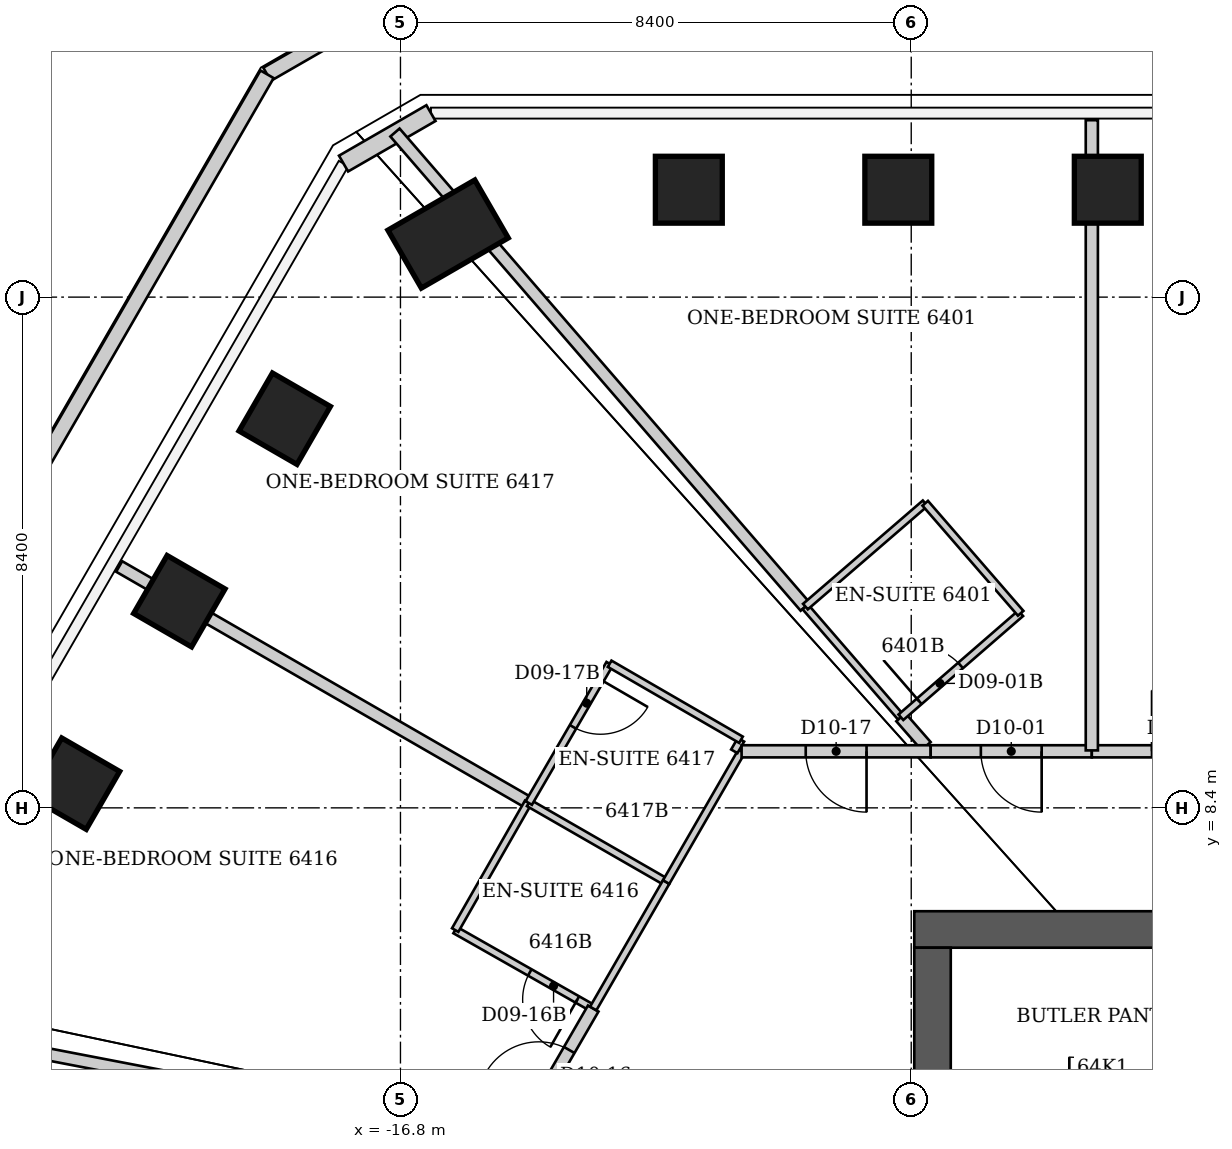
"""IFC4 building model, lengths in metres.
Left out: names, types, materials, properties, quantities, classifications, styles, units other than length and angle.
Written with IfcOpenShell. Run it as: python <this file> out.ifc"""

import sys

from ifc_helpers import new_model, si_unit, direction, frame, frame_2d, origin, origin_2d, place, context, subcontext, project, spatial, rectangle, extrude, clip, halfspace, element, fill, save


model = new_model("IFC4")
c1 = context("Model", 3, precision=1e-05, world=origin(), true_north=direction((0.0, 1.0)))
c2 = subcontext(c1, "Body", "Model", "MODEL_VIEW")
j1 = project(units=[si_unit("LENGTHUNIT", "METRE"), si_unit("PLANEANGLEUNIT", "RADIAN")], contexts=[c1])
p1 = place(None, origin())
s1 = spatial("IfcSite", under=j1, at=p1, CompositionType="ELEMENT")
p2 = place(p1, origin())
s2 = spatial("IfcBuilding", under=s1, at=p2, CompositionType="ELEMENT")
p3 = place(p2, frame((0.0, 0.0, 257.0)))
s3 = spatial("IfcBuildingStorey", under=s2, at=p3, CompositionType="ELEMENT", Elevation=257.0)
p4 = place(p3, frame((-12.058, 18.566, -0.067), z_axis=(0.0, 0.0, 1.0), x_axis=(0.0, 1.0, 0.0)))
e1 = element("IfcColumn", 1, at=p4, inside=s3, PredefinedType="COLUMN", context=c2, shape_type="SweptSolid", body=[
    clip(extrude(rectangle(XDim=1.1, YDim=1.1, at=origin_2d()), origin(), (0.0, 0.0, 1.0), 3.867), halfspace(frame((0.0, 0.0, 0.067)), True)),
])
p5 = place(p3, frame((-8.613, 18.566, -0.06), z_axis=(0.0, 0.0, 1.0), x_axis=(0.0, 1.0, 0.0)))
e2 = element("IfcColumn", 2, at=p5, inside=s3, PredefinedType="COLUMN", context=c2, shape_type="SweptSolid", body=[
    clip(extrude(rectangle(XDim=1.1, YDim=1.1, at=origin_2d()), origin(), (0.0, 0.0, 1.0), 3.86), halfspace(frame((0.0, 0.0, 0.06)), True)),
])
p6 = place(p3, frame((-5.167, 18.566, -0.052), z_axis=(0.0, 0.0, 1.0), x_axis=(0.0, 1.0, 0.0)))
e3 = element("IfcColumn", 3, at=p6, inside=s3, PredefinedType="COLUMN", context=c2, shape_type="SweptSolid", body=[
    clip(extrude(rectangle(XDim=1.1, YDim=1.1, at=origin_2d()), origin(), (0.0, 0.0, 1.0), 3.852), halfspace(frame((0.0, 0.0, 0.052)), True)),
])
p7 = place(p3, frame((-22.169, 8.798, -0.059), z_axis=(0.0, 0.0, 1.0), x_axis=(-0.866025403784, 0.5, 0.0)))
e4 = element("IfcColumn", 4, at=p7, inside=s3, PredefinedType="COLUMN", context=c2, shape_type="SweptSolid", body=[
    clip(extrude(rectangle(XDim=1.1, YDim=1.1, at=origin_2d()), origin(), (0.0, 0.0, 1.0), 3.859), halfspace(frame((0.0, 0.0, 0.059)), True)),
])
p8 = place(p3, frame((-20.437, 11.799, -0.051), z_axis=(0.0, 0.0, 1.0), x_axis=(-0.866025403784, 0.5, 0.0)))
e5 = element("IfcColumn", 5, at=p8, inside=s3, PredefinedType="COLUMN", context=c2, shape_type="SweptSolid", body=[
    clip(extrude(rectangle(XDim=1.1, YDim=1.1, at=origin_2d()), origin(), (0.0, 0.0, 1.0), 3.851), halfspace(frame((0.0, 0.0, 0.051)), True)),
])
p9 = place(p3, frame((-18.704, 14.8, -0.059), z_axis=(0.0, 0.0, 1.0), x_axis=(-0.866025403784, 0.5, 0.0)))
e6 = element("IfcColumn", 6, at=p9, inside=s3, PredefinedType="COLUMN", context=c2, shape_type="SweptSolid", body=[
    clip(extrude(rectangle(XDim=1.1, YDim=1.1, at=origin_2d()), origin(), (0.0, 0.0, 1.0), 3.859), halfspace(frame((0.0, 0.0, 0.059)), True)),
])
p10 = place(p3, frame((-16.017, 17.837, -0.069), z_axis=(0.0, 0.0, 1.0), x_axis=(-0.5, 0.866025403784, 0.0)))
e7 = element("IfcColumn", 7, at=p10, inside=s3, PredefinedType="COLUMN", context=c2, shape_type="SweptSolid", body=[
    clip(extrude(rectangle(XDim=1.1, YDim=1.65, at=origin_2d()), origin(), (0.0, 0.0, 1.0), 3.869), halfspace(frame((0.0, 0.0, 0.069)), True)),
])
p11 = place(p3, frame((-8.35, 6.4, 0.0), z_axis=(0.0, 0.0, 1.0), x_axis=(1.0, 0.0, 0.0)))
e8 = element("IfcWall", 8, at=p11, inside=s3, PredefinedType="SHEAR", context=c2, shape_type="SweptSolid", body=[
    extrude(rectangle(XDim=16.7, YDim=0.6, at=frame_2d((8.35, 0.0))), origin(), (0.0, 0.0, 1.0), 3.8),
])
p12 = place(p11, frame((6.488, 0.0, 0.0)))
e9 = element("IfcOpeningElement", 9, at=p12, cuts=e8, PredefinedType="OPENING", context=c2, shape_type="SweptSolid", body=[
    extrude(rectangle(XDim=1.1, YDim=2.1, at=frame_2d((0.55, 1.05))), frame((0.0, 0.3, 0.0), z_axis=(0.0, -1.0, 0.0), x_axis=(1.0, 0.0, 0.0)), (0.0, 0.0, 1.0), 0.6),
])
p13 = place(p11, frame((9.113, 0.0, 0.0)))
e10 = element("IfcOpeningElement", 10, at=p13, cuts=e8, PredefinedType="OPENING", context=c2, shape_type="SweptSolid", body=[
    extrude(rectangle(XDim=1.1, YDim=2.1, at=frame_2d((0.55, 1.05))), frame((0.0, 0.3, 0.0), z_axis=(0.0, -1.0, 0.0), x_axis=(1.0, 0.0, 0.0)), (0.0, 0.0, 1.0), 0.6),
])
p14 = place(p11, frame((11.738, 0.0, 0.0)))
e11 = element("IfcOpeningElement", 11, at=p14, cuts=e8, PredefinedType="OPENING", context=c2, shape_type="SweptSolid", body=[
    extrude(rectangle(XDim=1.1, YDim=2.1, at=frame_2d((0.55, 1.05))), frame((0.0, 0.3, 0.0), z_axis=(0.0, -1.0, 0.0), x_axis=(1.0, 0.0, 0.0)), (0.0, 0.0, 1.0), 0.6),
])
p15 = place(p11, frame((14.363, 0.0, 0.0)))
e12 = element("IfcOpeningElement", 12, at=p15, cuts=e8, PredefinedType="OPENING", context=c2, shape_type="SweptSolid", body=[
    extrude(rectangle(XDim=1.1, YDim=2.1, at=frame_2d((0.55, 1.05))), frame((0.0, 0.3, 0.0), z_axis=(0.0, -1.0, 0.0), x_axis=(1.0, 0.0, 0.0)), (0.0, 0.0, 1.0), 0.6),
])
p16 = place(p3, frame((-8.05, -6.1, 0.0), z_axis=(0.0, 0.0, 1.0), x_axis=(0.0, 1.0, 0.0)))
e13 = element("IfcWall", 13, at=p16, inside=s3, PredefinedType="SHEAR", context=c2, shape_type="SweptSolid", body=[
    extrude(rectangle(XDim=12.2, YDim=0.6, at=frame_2d((6.1, 0.0))), origin(), (0.0, 0.0, 1.0), 3.8),
])
p17 = place(p16, frame((7.6, 0.0, 0.0)))
e14 = element("IfcOpeningElement", 14, at=p17, cuts=e13, PredefinedType="OPENING", context=c2, shape_type="SweptSolid", body=[
    extrude(rectangle(XDim=1.2, YDim=2.2, at=frame_2d((0.6, 1.1))), frame((0.0, 0.3, 0.0), z_axis=(0.0, -1.0, 0.0), x_axis=(1.0, 0.0, 0.0)), (0.0, 0.0, 1.0), 0.6),
])
p18 = place(p3, frame((-17.736, 18.996, 0.0), z_axis=(0.0, 0.0, 1.0), x_axis=(0.866026405774, 0.499998264499, 0.0)))
e15 = element("IfcWall", 15, at=p18, inside=s3, PredefinedType="SOLIDWALL", context=c2, shape_type="SweptSolid", body=[
    extrude(rectangle(XDim=1.66, YDim=0.3, at=frame_2d((0.83, 0.0))), origin(), (0.0, 0.0, 1.0), 3.64),
])
p19 = place(p3, frame((-17.468, 21.344, 0.0), z_axis=(0.0, 0.0, 1.0), x_axis=(-0.866531606097, -0.499122205112, 0.0)))
e16 = element("IfcWall", 16, at=p19, inside=s3, PredefinedType="PARAPET", context=c2, shape_type="SweptSolid", body=[
    extrude(rectangle(XDim=1.761, YDim=0.25, at=frame_2d((0.88, 0.0))), origin(), (0.0, 0.0, 1.0), 1.1),
])
p20 = place(p3, frame((-18.994, 20.465, 0.0), z_axis=(0.0, 0.0, 1.0), x_axis=(-0.49999647861, -0.86602743685, 0.0)))
e17 = element("IfcWall", 17, at=p20, inside=s3, PredefinedType="PARAPET", context=c2, shape_type="SweptSolid", body=[
    extrude(rectangle(XDim=16.453, YDim=0.25, at=frame_2d((8.226, 0.0))), origin(), (0.0, 0.0, 1.0), 1.1),
])
p21 = place(p3, frame((-27.219, 4.456, 0.0), z_axis=(0.0, 0.0, 1.0), x_axis=(0.499998496786, -0.866026271663, 0.0)))
e18 = element("IfcWall", 18, at=p21, inside=s3, PredefinedType="PARAPET", context=c2, shape_type="SweptSolid", body=[
    extrude(rectangle(XDim=34.936, YDim=0.25, at=frame_2d((17.468, 0.0))), origin(), (0.0, 0.0, 1.0), 1.1),
])
p22 = place(p3, frame((-25.341, 4.874, 0.0), z_axis=(0.0, 0.0, 1.0), x_axis=(0.982001168061, -0.188874841966, 0.0)))
e19 = element("IfcWall", 19, at=p22, inside=s3, PredefinedType="PARTITIONING", context=c2, shape_type="SweptSolid", body=[
    extrude(rectangle(XDim=10.557, YDim=0.2, at=frame_2d((5.278, 0.0))), origin(), (0.0, 0.0, 1.0), 3.64),
])
p23 = place(p3, frame((-21.426, 12.37, 0.0), z_axis=(0.0, 0.0, 1.0), x_axis=(0.866202335538, -0.499693419917, 0.0)))
e20 = element("IfcWall", 20, at=p23, inside=s3, PredefinedType="PARTITIONING", context=c2, shape_type="SweptSolid", body=[
    extrude(rectangle(XDim=7.765, YDim=0.2, at=frame_2d((3.883, 0.0))), origin(), (0.0, 0.0, 1.0), 2.878),
])
p24 = place(p3, frame((-16.89, 19.507, 0.0), z_axis=(0.0, 0.0, 1.0), x_axis=(0.654250750888, -0.756277696989, 0.0)))
e21 = element("IfcWall", 21, at=p24, inside=s3, PredefinedType="PARTITIONING", context=c2, shape_type="SweptSolid", body=[
    extrude(rectangle(XDim=10.313, YDim=0.2, at=frame_2d((5.157, 0.0))), origin(), (0.0, 0.0, 1.0), 3.64),
])
p25 = place(p3, frame((-15.9, 6.39, 0.0), z_axis=(0.0, 0.0, 1.0), x_axis=(0.869431908012, -0.494052787999, 0.0)))
e22 = element("IfcWall", 22, at=p25, inside=s3, PredefinedType="PARTITIONING", context=c2, shape_type="SweptSolid", body=[
    extrude(rectangle(XDim=2.611, YDim=0.12, at=frame_2d((1.305, 0.0))), origin(), (0.0, 0.0, 1.0), 3.64),
])
p26 = place(p25, frame((1.411, 0.0, 0.0)))
e23 = element("IfcOpeningElement", 23, at=p26, cuts=e22, PredefinedType="OPENING", context=c2, shape_type="SweptSolid", body=[
    extrude(rectangle(XDim=0.9, YDim=2.03, at=frame_2d((0.45, 1.015))), frame((0.0, 0.06, 0.0), z_axis=(0.0, -1.0, 0.0), x_axis=(1.0, 0.0, 0.0)), (0.0, 0.0, 1.0), 0.12),
])
p27 = place(p3, frame((-14.92, 2.87, 0.0), z_axis=(0.0, 0.0, 1.0), x_axis=(0.500714932888, 0.865612243434, 0.0)))
e24 = element("IfcWall", 24, at=p27, inside=s3, PredefinedType="PARTITIONING", context=c2, shape_type="SweptSolid", body=[
    extrude(rectangle(XDim=2.576, YDim=0.2, at=frame_2d((1.288, 0.0))), origin(), (0.0, 0.0, 1.0), 3.64),
])
p28 = place(p27, frame((0.788, 0.0, 0.0)))
e25 = element("IfcOpeningElement", 25, at=p28, cuts=e24, PredefinedType="OPENING", context=c2, shape_type="SweptSolid", body=[
    extrude(rectangle(XDim=1.0, YDim=2.13, at=frame_2d((0.5, 1.065))), frame((0.0, 0.1, 0.0), z_axis=(0.0, -1.0, 0.0), x_axis=(1.0, 0.0, 0.0)), (0.0, 0.0, 1.0), 0.2),
])
p29 = place(p3, frame((-14.7, 8.49, 0.0), z_axis=(0.0, 0.0, 1.0), x_axis=(-0.496106327528, -0.868261776072, 0.0)))
e26 = element("IfcWall", 26, at=p29, inside=s3, PredefinedType="PARTITIONING", context=c2, shape_type="SweptSolid", body=[
    extrude(rectangle(XDim=2.419, YDim=0.12, at=frame_2d((1.209, 0.0))), origin(), (0.0, 0.0, 1.0), 3.64),
])
p30 = place(p3, frame((-14.69, 8.48, 0.0), z_axis=(0.0, 0.0, 1.0), x_axis=(0.866816256489, -0.498627694264, 0.0)))
e27 = element("IfcWall", 27, at=p30, inside=s3, PredefinedType="PARTITIONING", context=c2, shape_type="SweptSolid", body=[
    extrude(rectangle(XDim=2.607, YDim=0.12, at=frame_2d((1.304, 0.0))), origin(), (0.0, 0.0, 1.0), 2.878),
])
p31 = place(p3, frame((-13.63, 5.1, 0.0), z_axis=(0.0, 0.0, 1.0), x_axis=(0.499737123639, 0.866177122335, 0.0)))
e28 = element("IfcWall", 28, at=p31, inside=s3, PredefinedType="PARTITIONING", context=c2, shape_type="SweptSolid", body=[
    extrude(rectangle(XDim=2.401, YDim=0.12, at=frame_2d((1.201, 0.0))), origin(), (0.0, 0.0, 1.0), 3.64),
])
p32 = place(p3, frame((-13.36, 10.77, 0.0), z_axis=(0.0, 0.0, 1.0), x_axis=(-0.502173326652, -0.864766991738, 0.0)))
e29 = element("IfcWall", 29, at=p32, inside=s3, PredefinedType="PARTITIONING", context=c2, shape_type="SweptSolid", body=[
    extrude(rectangle(XDim=2.648, YDim=0.12, at=frame_2d((1.324, 0.0))), origin(), (0.0, 0.0, 1.0), 3.64),
])
p33 = place(p32, frame((0.3, 0.0, 0.0)))
e30 = element("IfcOpeningElement", 30, at=p33, cuts=e29, PredefinedType="OPENING", context=c2, shape_type="SweptSolid", body=[
    extrude(rectangle(XDim=0.9, YDim=2.03, at=frame_2d((0.45, 1.015))), frame((0.0, 0.06, 0.0), z_axis=(0.0, -1.0, 0.0), x_axis=(1.0, 0.0, 0.0)), (0.0, 0.0, 1.0), 0.12),
])
p34 = place(p3, frame((-12.43, 7.18, 0.0), z_axis=(0.0, 0.0, 1.0), x_axis=(0.499577688184, 0.866269088372, 0.0)))
e31 = element("IfcWall", 31, at=p34, inside=s3, PredefinedType="PARTITIONING", context=c2, shape_type="SweptSolid", body=[
    extrude(rectangle(XDim=2.482, YDim=0.12, at=frame_2d((1.241, 0.0))), origin(), (0.0, 0.0, 1.0), 3.64),
])
p35 = place(p3, frame((-11.31, 9.33, 0.0), z_axis=(0.0, 0.0, 1.0), x_axis=(0.501518373175, 0.865146994081, 0.0)))
e32 = element("IfcWall", 32, at=p35, inside=s3, PredefinedType="PARTITIONING", context=c2, shape_type="SweptSolid", body=[
    extrude(rectangle(XDim=0.219, YDim=0.12, at=frame_2d((0.11, 0.0))), origin(), (0.0, 0.0, 1.0), 3.64),
])
p36 = place(p3, frame((-11.2, 9.52, 0.0), z_axis=(0.0, 0.0, 1.0), x_axis=(-0.865533423938, 0.500851167559, 0.0)))
e33 = element("IfcWall", 33, at=p36, inside=s3, PredefinedType="PARTITIONING", context=c2, shape_type="SweptSolid", body=[
    extrude(rectangle(XDim=2.496, YDim=0.12, at=frame_2d((1.248, 0.0))), origin(), (0.0, 0.0, 1.0), 3.64),
])
p37 = place(p3, frame((-10.143, 11.708, 0.0), z_axis=(0.0, 0.0, 1.0), x_axis=(0.65433095071, -0.756208309226, 0.0)))
e34 = element("IfcWall", 34, at=p37, inside=s3, PredefinedType="PARTITIONING", context=c2, shape_type="SweptSolid", body=[
    extrude(rectangle(XDim=2.404, YDim=0.12, at=frame_2d((1.202, 0.0))), origin(), (0.0, 0.0, 1.0), 3.64),
])
p38 = place(p3, frame((-8.57, 9.89, 0.0), z_axis=(0.0, 0.0, 1.0), x_axis=(0.658587029901, -0.752504567459, 0.0)))
e35 = element("IfcWall", 35, at=p38, inside=s3, PredefinedType="PARTITIONING", context=c2, shape_type="SweptSolid", body=[
    extrude(rectangle(XDim=0.629, YDim=0.2, at=frame_2d((0.314, 0.0))), origin(), (0.0, 0.0, 1.0), 3.64),
])
p39 = place(p3, frame((-8.57, 9.89, 0.0), z_axis=(0.0, 0.0, 1.0), x_axis=(0.755185511235, 0.655511131576, 0.0)))
e36 = element("IfcWall", 36, at=p39, inside=s3, PredefinedType="PARTITIONING", context=c2, shape_type="SweptSolid", body=[
    extrude(rectangle(XDim=2.609, YDim=0.12, at=frame_2d((1.304, 0.0))), origin(), (0.0, 0.0, 1.0), 3.64),
])
p40 = place(p39, frame((0.4, 0.0, 0.0)))
e37 = element("IfcOpeningElement", 37, at=p40, cuts=e36, PredefinedType="OPENING", context=c2, shape_type="SweptSolid", body=[
    extrude(rectangle(XDim=0.9, YDim=2.03, at=frame_2d((0.45, 1.015))), frame((0.0, 0.06, 0.0), z_axis=(0.0, -1.0, 0.0), x_axis=(1.0, 0.0, 0.0)), (0.0, 0.0, 1.0), 0.12),
])
p41 = place(p3, frame((-8.17, 13.41, 0.0), z_axis=(0.0, 0.0, 1.0), x_axis=(-0.757086659925, -0.653314464377, 0.0)))
e38 = element("IfcWall", 38, at=p41, inside=s3, PredefinedType="PARTITIONING", context=c2, shape_type="SweptSolid", body=[
    extrude(rectangle(XDim=2.602, YDim=0.12, at=frame_2d((1.301, 0.0))), origin(), (0.0, 0.0, 1.0), 3.64),
])
p42 = place(p3, frame((-8.08, 9.33, 0.0), z_axis=(0.0, 0.0, 1.0), x_axis=(-1.0, 0.0, 0.0)))
e39 = element("IfcWall", 39, at=p42, inside=s3, PredefinedType="PARTITIONING", context=c2, shape_type="SweptSolid", body=[
    extrude(rectangle(XDim=3.11, YDim=0.2, at=frame_2d((1.555, 0.0))), origin(), (0.0, 0.0, 1.0), 3.64),
])
p43 = place(p42, frame((1.055, 0.0, 0.0)))
e40 = element("IfcOpeningElement", 40, at=p43, cuts=e39, PredefinedType="OPENING", context=c2, shape_type="SweptSolid", body=[
    extrude(rectangle(XDim=1.0, YDim=2.13, at=frame_2d((0.5, 1.065))), frame((0.0, 0.1, 0.0), z_axis=(0.0, -1.0, 0.0), x_axis=(1.0, 0.0, 0.0)), (0.0, 0.0, 1.0), 0.2),
])
p44 = place(p3, frame((-6.6, 11.6, 0.0), z_axis=(0.0, 0.0, 1.0), x_axis=(-0.655244729861, 0.755416669123, 0.0)))
e41 = element("IfcWall", 41, at=p44, inside=s3, PredefinedType="PARTITIONING", context=c2, shape_type="SweptSolid", body=[
    extrude(rectangle(XDim=2.396, YDim=0.12, at=frame_2d((1.198, 0.0))), origin(), (0.0, 0.0, 1.0), 3.64),
])
p45 = place(p3, frame((-5.43, 9.33, 0.0), z_axis=(0.0, 0.0, 1.0), x_axis=(-1.0, 0.0, 0.0)))
e42 = element("IfcWall", 42, at=p45, inside=s3, PredefinedType="PARTITIONING", context=c2, shape_type="SweptSolid", body=[
    extrude(rectangle(XDim=2.65, YDim=0.2, at=frame_2d((1.325, 0.0))), origin(), (0.0, 0.0, 1.0), 3.64),
])
p46 = place(p45, frame((0.825, 0.0, 0.0)))
e43 = element("IfcOpeningElement", 43, at=p46, cuts=e42, PredefinedType="OPENING", context=c2, shape_type="SweptSolid", body=[
    extrude(rectangle(XDim=1.0, YDim=2.13, at=frame_2d((0.5, 1.065))), frame((0.0, 0.1, 0.0), z_axis=(0.0, -1.0, 0.0), x_axis=(1.0, 0.0, 0.0)), (0.0, 0.0, 1.0), 0.2),
])
p47 = place(p3, frame((-5.43, 9.33, 0.0), z_axis=(0.0, 0.0, 1.0), x_axis=(1.0, 0.0, 0.0)))
e44 = element("IfcWall", 44, at=p47, inside=s3, PredefinedType="PARTITIONING", context=c2, shape_type="SweptSolid", body=[
    extrude(rectangle(XDim=2.98, YDim=0.2, at=frame_2d((1.49, 0.0))), origin(), (0.0, 0.0, 1.0), 3.64),
])
p48 = place(p47, frame((0.99, 0.0, 0.0)))
e45 = element("IfcOpeningElement", 45, at=p48, cuts=e44, PredefinedType="OPENING", context=c2, shape_type="SweptSolid", body=[
    extrude(rectangle(XDim=1.0, YDim=2.13, at=frame_2d((0.5, 1.065))), frame((0.0, 0.1, 0.0), z_axis=(0.0, -1.0, 0.0), x_axis=(1.0, 0.0, 0.0)), (0.0, 0.0, 1.0), 0.2),
])
p49 = place(p3, frame((-5.43, 19.71, 0.0), z_axis=(0.0, 0.0, 1.0), x_axis=(0.0, -1.0, 0.0)))
e46 = element("IfcWall", 46, at=p49, inside=s3, PredefinedType="PARTITIONING", context=c2, shape_type="SweptSolid", body=[
    extrude(rectangle(XDim=10.365, YDim=0.2, at=frame_2d((5.183, 0.0))), origin(), (0.0, 0.0, 1.0), 3.64),
])
p50 = place(p46, origin())
e47 = element("IfcDoor", 47, at=p50, inside=s3, OperationType="SINGLE_SWING_LEFT", PredefinedType="DOOR", context=c2, shape_type="SweptSolid", body=[
    extrude(rectangle(XDim=1.0, YDim=2.13, at=frame_2d((0.5, 1.065))), frame((0.0, 0.025, 0.0), z_axis=(0.0, -1.0, 0.0), x_axis=(1.0, 0.0, 0.0)), (0.0, 0.0, 1.0), 0.05),
])
fill(e43, e47)
p51 = place(p40, origin())
e48 = element("IfcDoor", 48, at=p51, inside=s3, OperationType="SINGLE_SWING_LEFT", PredefinedType="DOOR", context=c2, shape_type="SweptSolid", body=[
    extrude(rectangle(XDim=0.9, YDim=2.03, at=frame_2d((0.45, 1.015))), frame((0.0, 0.025, 0.0), z_axis=(0.0, -1.0, 0.0), x_axis=(1.0, 0.0, 0.0)), (0.0, 0.0, 1.0), 0.05),
])
fill(e37, e48)
p52 = place(p48, origin())
e49 = element("IfcDoor", 49, at=p52, inside=s3, OperationType="SINGLE_SWING_LEFT", PredefinedType="DOOR", context=c2, shape_type="SweptSolid", body=[
    extrude(rectangle(XDim=1.0, YDim=2.13, at=frame_2d((0.5, 1.065))), frame((0.0, 0.025, 0.0), z_axis=(0.0, -1.0, 0.0), x_axis=(1.0, 0.0, 0.0)), (0.0, 0.0, 1.0), 0.05),
])
fill(e45, e49)
p53 = place(p28, origin())
e50 = element("IfcDoor", 50, at=p53, inside=s3, OperationType="SINGLE_SWING_LEFT", PredefinedType="DOOR", context=c2, shape_type="SweptSolid", body=[
    extrude(rectangle(XDim=1.0, YDim=2.13, at=frame_2d((0.5, 1.065))), frame((0.0, 0.025, 0.0), z_axis=(0.0, -1.0, 0.0), x_axis=(1.0, 0.0, 0.0)), (0.0, 0.0, 1.0), 0.05),
])
fill(e25, e50)
p54 = place(p26, origin())
e51 = element("IfcDoor", 51, at=p54, inside=s3, OperationType="SINGLE_SWING_RIGHT", PredefinedType="DOOR", context=c2, shape_type="SweptSolid", body=[
    extrude(rectangle(XDim=0.9, YDim=2.03, at=frame_2d((0.45, 1.015))), frame((0.0, 0.025, 0.0), z_axis=(0.0, -1.0, 0.0), x_axis=(1.0, 0.0, 0.0)), (0.0, 0.0, 1.0), 0.05),
])
fill(e23, e51)
p55 = place(p43, origin())
e52 = element("IfcDoor", 52, at=p55, inside=s3, OperationType="SINGLE_SWING_LEFT", PredefinedType="DOOR", context=c2, shape_type="SweptSolid", body=[
    extrude(rectangle(XDim=1.0, YDim=2.13, at=frame_2d((0.5, 1.065))), frame((0.0, 0.025, 0.0), z_axis=(0.0, -1.0, 0.0), x_axis=(1.0, 0.0, 0.0)), (0.0, 0.0, 1.0), 0.05),
])
fill(e40, e52)
p56 = place(p33, origin())
e53 = element("IfcDoor", 53, at=p56, inside=s3, OperationType="SINGLE_SWING_LEFT", PredefinedType="DOOR", context=c2, shape_type="SweptSolid", body=[
    extrude(rectangle(XDim=0.9, YDim=2.03, at=frame_2d((0.45, 1.015))), frame((0.0, 0.025, 0.0), z_axis=(0.0, -1.0, 0.0), x_axis=(1.0, 0.0, 0.0)), (0.0, 0.0, 1.0), 0.05),
])
fill(e30, e53)
save(model, sys.argv[1])
